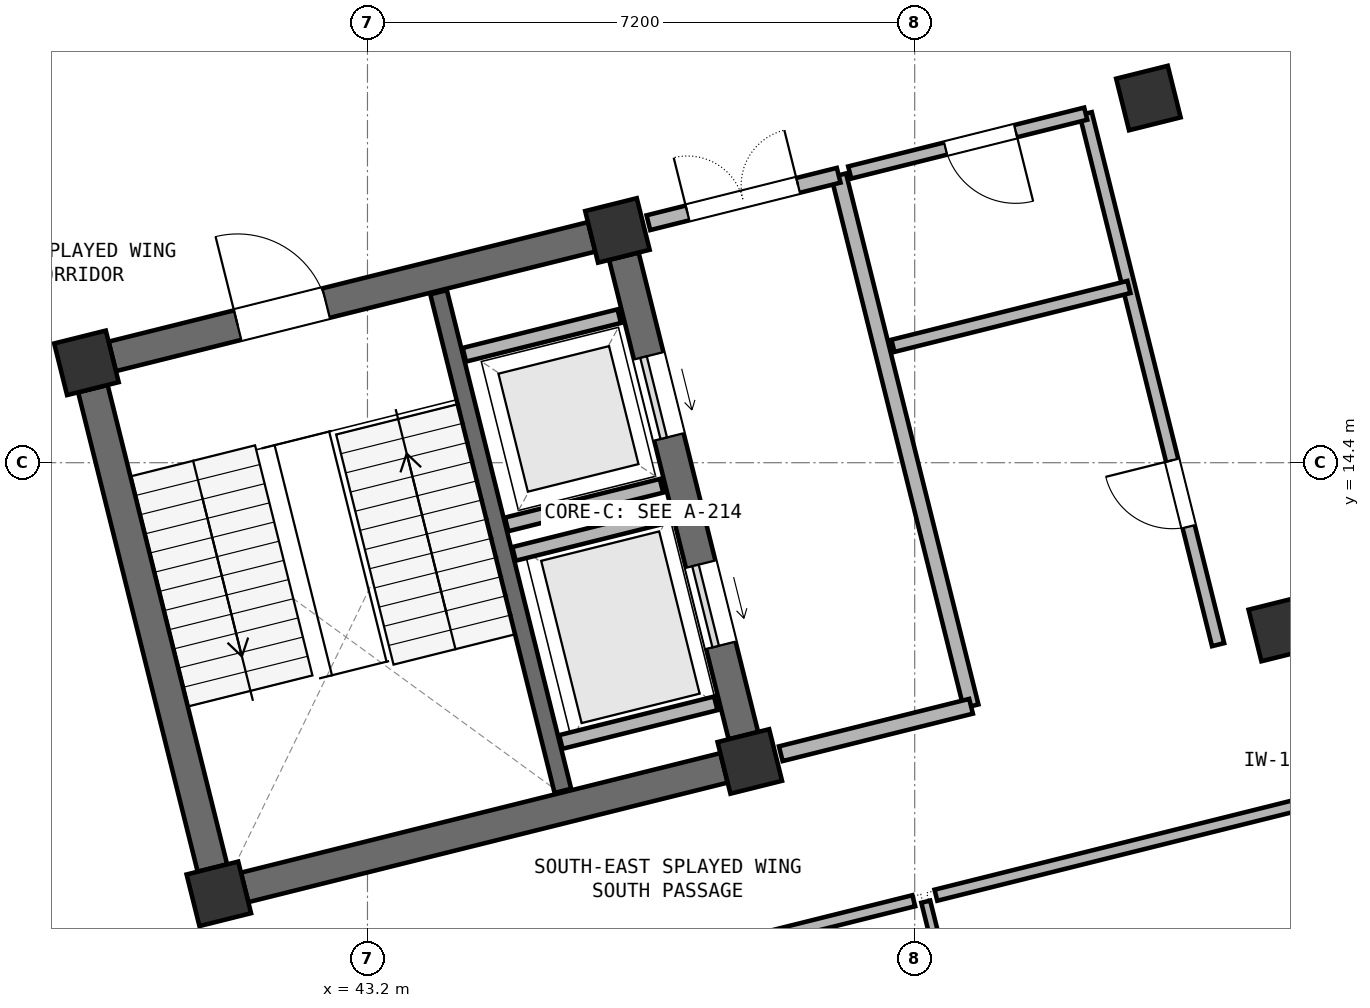
"""IFC4 building model, lengths in metres.
Left out: names, types, materials, properties, quantities, classifications, styles, units other than length and angle.
Written with IfcOpenShell. Run it as: python <this file> out.ifc"""

import sys

from ifc_helpers import new_model, si_unit, direction, frame, frame_2d, origin, origin_2d, place, context, subcontext, project, spatial, rectangle, extrude, element, fill, save


model = new_model("IFC4")
c1 = context("Model", 3, precision=1e-05, world=origin(), true_north=direction((0.0, 1.0)))
c2 = subcontext(c1, "Body", "Model", "MODEL_VIEW")
j1 = project(units=[si_unit("LENGTHUNIT", "METRE"), si_unit("PLANEANGLEUNIT", "RADIAN")], contexts=[c1])
p1 = place(None, origin())
s1 = spatial("IfcSite", under=j1, at=p1, CompositionType="ELEMENT")
p2 = place(p1, origin())
s2 = spatial("IfcBuilding", under=s1, at=p2, CompositionType="ELEMENT")
p3 = place(p2, frame((0.0, 0.0, 10.2)))
s3 = spatial("IfcBuildingStorey", under=s2, at=p3, CompositionType="ELEMENT", Elevation=10.2)
for number, where, z_axis, x_axis in (
    (1, (41.244, 8.728, 0.0), (0.0, 0.0, 1.0), (0.97, 0.242, 0.0)),
    (2, (39.502, 15.714, 0.0), (0.0, 0.0, 1.0), (0.97, 0.242, 0.0)),
    (3, (48.23, 10.47, 0.0), (0.0, 0.0, 1.0), (0.97, 0.242, 0.0)),
    (4, (46.489, 17.456, 0.0), (0.0, 0.0, 1.0), (0.97, 0.242, 0.0)),
    (5, (55.217, 12.212, 0.0), (0.0, 0.0, 1.0), (0.97, 0.242, 0.0)),
    (6, (53.475, 19.198, 0.0), (0.0, 0.0, 1.0), (0.97, 0.242, 0.0)),
):
    element("IfcColumn", number, at=place(p3, frame(where, z_axis=z_axis, x_axis=x_axis)), inside=s3, PredefinedType="COLUMN", context=c2, shape_type="SweptSolid", body=[
        extrude(rectangle(XDim=0.7, YDim=0.7, at=origin_2d()), origin(), (0.0, 0.0, 1.0), 4.2),
    ])
p4 = place(p3, frame((41.584, 8.813, 0.0), z_axis=(0.0, 0.0, 1.0), x_axis=(0.970294759049, 0.241925774902, 0.0)))
e7 = element("IfcWall", 7, at=p4, inside=s3, PredefinedType="SHEAR", context=c2, shape_type="SweptSolid", body=[
    extrude(rectangle(XDim=6.5, YDim=0.4, at=frame_2d((3.25, 0.0))), origin(), (0.0, 0.0, 1.0), 4.2),
])
p5 = place(p3, frame((48.146, 10.809, 0.0), z_axis=(0.0, 0.0, 1.0), x_axis=(-0.241925774902, 0.970294759049, 0.0)))
e8 = element("IfcWall", 8, at=p5, inside=s3, PredefinedType="SHEAR", context=c2, shape_type="SweptSolid", body=[
    extrude(rectangle(XDim=6.5, YDim=0.4, at=frame_2d((3.25, 0.0))), origin(), (0.0, 0.0, 1.0), 4.2),
])
p6 = place(p5, frame((1.225, 0.0, 0.0)))
e9 = element("IfcOpeningElement", 9, at=p6, cuts=e8, PredefinedType="OPENING", context=c2, shape_type="SweptSolid", body=[
    extrude(rectangle(XDim=1.1, YDim=2.2, at=frame_2d((0.55, 1.1))), frame((0.0, 0.21, 0.0), z_axis=(0.0, -1.0, 0.0), x_axis=(1.0, 0.0, 0.0)), (0.0, 0.0, 1.0), 0.42),
])
p7 = place(p5, frame((4.05, 0.0, 0.0)))
e10 = element("IfcOpeningElement", 10, at=p7, cuts=e8, PredefinedType="OPENING", context=c2, shape_type="SweptSolid", body=[
    extrude(rectangle(XDim=1.1, YDim=2.2, at=frame_2d((0.55, 1.1))), frame((0.0, 0.21, 0.0), z_axis=(0.0, -1.0, 0.0), x_axis=(1.0, 0.0, 0.0)), (0.0, 0.0, 1.0), 0.42),
])
p8 = place(p3, frame((46.149, 17.371, 0.0), z_axis=(0.0, 0.0, 1.0), x_axis=(-0.970294759049, -0.241925774902, 0.0)))
e11 = element("IfcWall", 11, at=p8, inside=s3, PredefinedType="SHEAR", context=c2, shape_type="SweptSolid", body=[
    extrude(rectangle(XDim=6.5, YDim=0.4, at=frame_2d((3.25, 0.0))), origin(), (0.0, 0.0, 1.0), 4.2),
])
p9 = place(p8, frame((3.6, 0.0, 0.0)))
e12 = element("IfcOpeningElement", 12, at=p9, cuts=e11, PredefinedType="OPENING", context=c2, shape_type="SweptSolid", body=[
    extrude(rectangle(XDim=1.2, YDim=2.2, at=frame_2d((0.6, 1.1))), frame((0.0, 0.21, 0.0), z_axis=(0.0, -1.0, 0.0), x_axis=(1.0, 0.0, 0.0)), (0.0, 0.0, 1.0), 0.42),
])
p10 = place(p3, frame((39.587, 15.375, 0.0), z_axis=(0.0, 0.0, 1.0), x_axis=(0.241925774902, -0.970294759049, 0.0)))
e13 = element("IfcWall", 13, at=p10, inside=s3, PredefinedType="SHEAR", context=c2, shape_type="SweptSolid", body=[
    extrude(rectangle(XDim=6.5, YDim=0.4, at=frame_2d((3.25, 0.0))), origin(), (0.0, 0.0, 1.0), 4.2),
])
p11 = place(p3, frame((45.771, 10.083, 0.0), z_axis=(0.0, 0.0, 1.0), x_axis=(-0.241898249226, 0.970301621673, 0.0)))
e14 = element("IfcWall", 14, at=p11, inside=s3, PredefinedType="SHEAR", context=c2, shape_type="SweptSolid", body=[
    extrude(rectangle(XDim=6.76, YDim=0.225, at=frame_2d((3.38, 0.0))), origin(), (0.0, 0.0, 1.0), 4.2),
])
for number, where, z_axis, x_axis in (
    (15, (45.745, 10.726, 0.0), (0.0, 0.0, 1.0), (0.97, 0.242, 0.0)),
    (16, (45.128, 13.2, 0.0), (0.0, 0.0, 1.0), (0.97, 0.242, 0.0)),
    (17, (45.031, 13.588, 0.0), (0.0, 0.0, 1.0), (0.97, 0.242, 0.0)),
    (18, (44.475, 15.82, 0.0), (0.0, 0.0, 1.0), (0.97, 0.242, 0.0)),
):
    element("IfcWall", number, at=place(p3, frame(where, z_axis=z_axis, x_axis=x_axis)), inside=s3, PredefinedType="PARTITIONING", context=c2, shape_type="SweptSolid", body=[
        extrude(rectangle(XDim=2.1, YDim=0.185, at=frame_2d((1.05, 0.0))), origin(), (0.0, 0.0, 1.0), 4.2),
    ])
p12 = place(p3, frame((51.141, 11.196, 0.0), z_axis=(0.0, 0.0, 1.0), x_axis=(-0.241937193493, 0.970291911955, 0.0)))
e19 = element("IfcWall", 19, at=p12, inside=s3, PredefinedType="PARTITIONING", context=c2, shape_type="SweptSolid", body=[
    extrude(rectangle(XDim=7.2, YDim=0.2, at=frame_2d((3.6, 0.0))), origin(), (0.0, 0.0, 1.0), 3.08),
])
p13 = place(p3, frame((48.638, 10.572, 0.0), z_axis=(0.0, 0.0, 1.0), x_axis=(0.970309259708, 0.2418676095, 0.0)))
e20 = element("IfcWall", 20, at=p13, inside=s3, PredefinedType="PARTITIONING", context=c2, shape_type="SweptSolid", body=[
    extrude(rectangle(XDim=2.58, YDim=0.2, at=frame_2d((1.29, 0.0))), origin(), (0.0, 0.0, 1.0), 3.08),
])
p14 = place(p3, frame((49.399, 18.182, 0.0), z_axis=(0.0, 0.0, 1.0), x_axis=(-0.970309259708, -0.2418676095, 0.0)))
e21 = element("IfcWall", 21, at=p14, inside=s3, PredefinedType="PARTITIONING", context=c2, shape_type="SweptSolid", body=[
    extrude(rectangle(XDim=2.58, YDim=0.2, at=frame_2d((1.29, 0.0))), origin(), (0.0, 0.0, 1.0), 3.08),
])
p15 = place(p14, frame((0.55, 0.0, 0.0)))
e22 = element("IfcOpeningElement", 22, at=p15, cuts=e21, PredefinedType="OPENING", context=c2, shape_type="SweptSolid", body=[
    extrude(rectangle(XDim=1.5, YDim=2.2, at=frame_2d((0.75, 1.1))), frame((0.0, 0.11, 0.0), z_axis=(0.0, -1.0, 0.0), x_axis=(1.0, 0.0, 0.0)), (0.0, 0.0, 1.0), 0.22),
])
p16 = place(p3, frame((54.392, 12.006, 0.0), z_axis=(0.0, 0.0, 1.0), x_axis=(-0.241937193493, 0.970291911955, 0.0)))
e23 = element("IfcWall", 23, at=p16, inside=s3, PredefinedType="PARTITIONING", context=c2, shape_type="SweptSolid", body=[
    extrude(rectangle(XDim=7.2, YDim=0.165, at=frame_2d((3.6, 0.0))), origin(), (0.0, 0.0, 1.0), 3.08),
])
p17 = place(p16, frame((1.6, 0.0, 0.0)))
e24 = element("IfcOpeningElement", 24, at=p17, cuts=e23, PredefinedType="OPENING", context=c2, shape_type="SweptSolid", body=[
    extrude(rectangle(XDim=0.9, YDim=2.15, at=frame_2d((0.45, 1.075))), frame((0.0, 0.093, 0.0), z_axis=(0.0, -1.0, 0.0), x_axis=(1.0, 0.0, 0.0)), (0.0, 0.0, 1.0), 0.185),
])
p18 = place(p3, frame((52.65, 18.992, 0.0), z_axis=(0.0, 0.0, 1.0), x_axis=(-0.970294894235, -0.241925232711, 0.0)))
e25 = element("IfcWall", 25, at=p18, inside=s3, PredefinedType="PARTITIONING", context=c2, shape_type="SweptSolid", body=[
    extrude(rectangle(XDim=3.2, YDim=0.165, at=frame_2d((1.6, 0.0))), origin(), (0.0, 0.0, 1.0), 3.08),
])
p19 = place(p18, frame((0.95, 0.0, 0.0)))
e26 = element("IfcOpeningElement", 26, at=p19, cuts=e25, PredefinedType="OPENING", context=c2, shape_type="SweptSolid", body=[
    extrude(rectangle(XDim=0.95, YDim=2.15, at=frame_2d((0.475, 1.075))), frame((0.0, 0.093, 0.0), z_axis=(0.0, -1.0, 0.0), x_axis=(1.0, 0.0, 0.0)), (0.0, 0.0, 1.0), 0.185),
])
p20 = place(p3, frame((50.114, 15.938, 0.0), z_axis=(0.0, 0.0, 1.0), x_axis=(0.970294894235, 0.241925232711, 0.0)))
e27 = element("IfcWall", 27, at=p20, inside=s3, PredefinedType="PARTITIONING", context=c2, shape_type="SweptSolid", body=[
    extrude(rectangle(XDim=3.2, YDim=0.165, at=frame_2d((1.6, 0.0))), origin(), (0.0, 0.0, 1.0), 3.08),
])
p21 = place(p3, frame((35.542, 4.936, 0.0), z_axis=(0.0, 0.0, 1.0), x_axis=(0.97029624016, 0.241919834513, 0.0)))
e28 = element("IfcWall", 28, at=p21, inside=s3, PredefinedType="PARTITIONING", context=c2, shape_type="SweptSolid", body=[
    extrude(rectangle(XDim=15.3, YDim=0.15, at=frame_2d((7.65, 0.0))), origin(), (0.0, 0.0, 1.0), 3.08),
])
p22 = place(p21, frame((1.65, 0.0, 0.0)))
e29 = element("IfcOpeningElement", 29, at=p22, cuts=e28, PredefinedType="OPENING", context=c2, shape_type="SweptSolid", body=[
    extrude(rectangle(XDim=1.6, YDim=2.2, at=frame_2d((0.8, 1.1))), frame((0.0, 0.085, 0.0), z_axis=(0.0, -1.0, 0.0), x_axis=(1.0, 0.0, 0.0)), (0.0, 0.0, 1.0), 0.17),
])
p23 = place(p3, frame((50.679, 8.71, 0.0), z_axis=(0.0, 0.0, 1.0), x_axis=(0.97029768554, 0.241914037287, 0.0)))
e30 = element("IfcWall", 30, at=p23, inside=s3, PredefinedType="PARTITIONING", context=c2, shape_type="SweptSolid", body=[
    extrude(rectangle(XDim=18.3, YDim=0.15, at=frame_2d((9.15, 0.0))), origin(), (0.0, 0.0, 1.0), 3.08),
])
p24 = place(p23, frame((8.65, 0.0, 0.0)))
e31 = element("IfcOpeningElement", 31, at=p24, cuts=e30, PredefinedType="OPENING", context=c2, shape_type="SweptSolid", body=[
    extrude(rectangle(XDim=1.0, YDim=2.2, at=frame_2d((0.5, 1.1))), frame((0.0, 0.085, 0.0), z_axis=(0.0, -1.0, 0.0), x_axis=(1.0, 0.0, 0.0)), (0.0, 0.0, 1.0), 0.17),
])
p25 = place(p3, frame((51.675, 4.094, 0.0), z_axis=(0.0, 0.0, 1.0), x_axis=(-0.241945139998, 0.970289930501, 0.0)))
e32 = element("IfcWall", 32, at=p25, inside=s3, PredefinedType="PARTITIONING", context=c2, shape_type="SweptSolid", body=[
    extrude(rectangle(XDim=4.67, YDim=0.12, at=frame_2d((2.335, 0.0))), origin(), (0.0, 0.0, 1.0), 3.08),
])
p26 = place(p6, origin())
e33 = element("IfcDoor", 33, at=p26, inside=s3, OperationType="SLIDING_TO_LEFT", PredefinedType="DOOR", context=c2, shape_type="SweptSolid", body=[
    extrude(rectangle(XDim=1.1, YDim=2.2, at=frame_2d((0.55, 1.1))), frame((0.0, 0.025, 0.0), z_axis=(0.0, -1.0, 0.0), x_axis=(1.0, 0.0, 0.0)), (0.0, 0.0, 1.0), 0.05),
])
fill(e9, e33)
p27 = place(p7, origin())
e34 = element("IfcDoor", 34, at=p27, inside=s3, OperationType="SLIDING_TO_LEFT", PredefinedType="DOOR", context=c2, shape_type="SweptSolid", body=[
    extrude(rectangle(XDim=1.1, YDim=2.2, at=frame_2d((0.55, 1.1))), frame((0.0, 0.025, 0.0), z_axis=(0.0, -1.0, 0.0), x_axis=(1.0, 0.0, 0.0)), (0.0, 0.0, 1.0), 0.05),
])
fill(e10, e34)
p28 = place(p9, frame((1.2, 0.0, 0.0), z_axis=(0.0, 0.0, 1.0), x_axis=(-1.0, 0.0, 0.0)))
e35 = element("IfcDoor", 35, at=p28, inside=s3, OperationType="SINGLE_SWING_LEFT", PredefinedType="DOOR", context=c2, shape_type="SweptSolid", body=[
    extrude(rectangle(XDim=1.2, YDim=2.2, at=frame_2d((0.6, 1.1))), frame((0.0, 0.025, 0.0), z_axis=(0.0, -1.0, 0.0), x_axis=(1.0, 0.0, 0.0)), (0.0, 0.0, 1.0), 0.05),
])
fill(e12, e35)
p29 = place(p15, frame((1.5, 0.0, 0.0), z_axis=(0.0, 0.0, 1.0), x_axis=(-1.0, 0.0, 0.0)))
e36 = element("IfcDoor", 36, at=p29, inside=s3, OperationType="DOUBLE_DOOR_SINGLE_SWING", PredefinedType="DOOR", context=c2, shape_type="SweptSolid", body=[
    extrude(rectangle(XDim=1.5, YDim=2.2, at=frame_2d((0.75, 1.1))), frame((0.0, 0.025, 0.0), z_axis=(0.0, -1.0, 0.0), x_axis=(1.0, 0.0, 0.0)), (0.0, 0.0, 1.0), 0.05),
])
fill(e22, e36)
p30 = place(p17, origin())
e37 = element("IfcDoor", 37, at=p30, inside=s3, OperationType="SINGLE_SWING_RIGHT", PredefinedType="DOOR", context=c2, shape_type="SweptSolid", body=[
    extrude(rectangle(XDim=0.9, YDim=2.15, at=frame_2d((0.45, 1.075))), frame((0.0, 0.025, 0.0), z_axis=(0.0, -1.0, 0.0), x_axis=(1.0, 0.0, 0.0)), (0.0, 0.0, 1.0), 0.05),
])
fill(e24, e37)
p31 = place(p19, origin())
e38 = element("IfcDoor", 38, at=p31, inside=s3, OperationType="SINGLE_SWING_LEFT", PredefinedType="DOOR", context=c2, shape_type="SweptSolid", body=[
    extrude(rectangle(XDim=0.95, YDim=2.15, at=frame_2d((0.475, 1.075))), frame((0.0, 0.025, 0.0), z_axis=(0.0, -1.0, 0.0), x_axis=(1.0, 0.0, 0.0)), (0.0, 0.0, 1.0), 0.05),
])
fill(e26, e38)
save(model, sys.argv[1])
